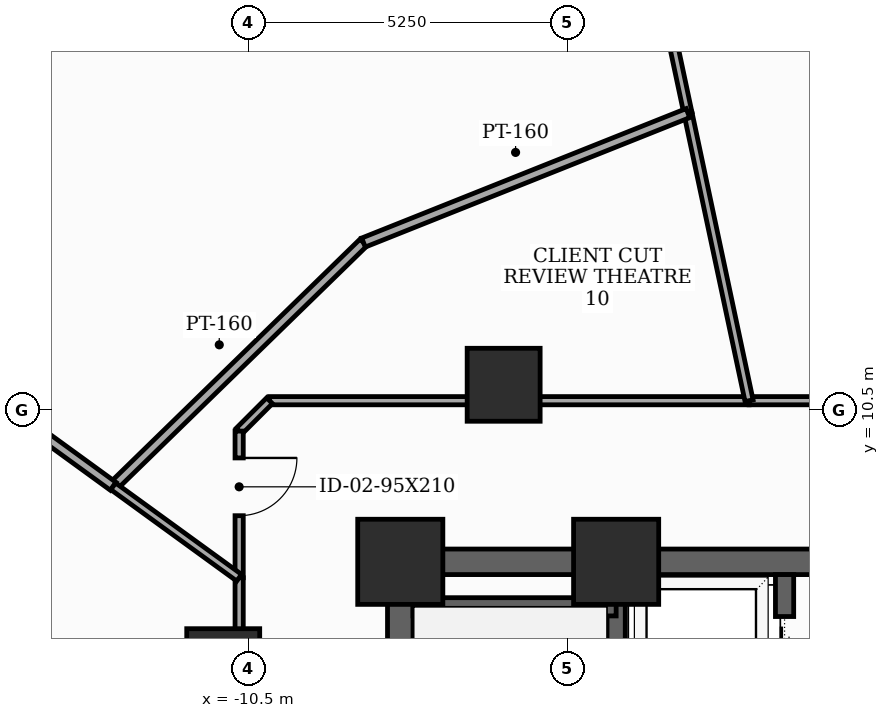
"""IFC4 building model, lengths in metres.
Left out: names, types, materials, properties, quantities, classifications, styles, units other than length and angle.
Written with IfcOpenShell. Run it as: python <this file> out.ifc"""

import sys

from ifc_helpers import new_model, si_unit, direction, frame, frame_2d, origin, origin_2d, place, context, subcontext, project, spatial, rectangle, extrude, element, fill, save


model = new_model("IFC4")
c1 = context("Model", 3, precision=1e-05, world=origin(), true_north=direction((0.0, 1.0)))
c2 = subcontext(c1, "Body", "Model", "MODEL_VIEW")
j1 = project(units=[si_unit("LENGTHUNIT", "METRE"), si_unit("PLANEANGLEUNIT", "RADIAN")], contexts=[c1])
p1 = place(None, origin())
s1 = spatial("IfcSite", under=j1, at=p1, CompositionType="ELEMENT")
p2 = place(p1, origin())
s2 = spatial("IfcBuilding", under=s1, at=p2, CompositionType="ELEMENT")
p3 = place(p2, frame((0.0, 0.0, 90.3)))
s3 = spatial("IfcBuildingStorey", under=s2, at=p3, CompositionType="ELEMENT", Elevation=90.3)
for number, where, z_axis, x_axis in (
    (1, (-4.45, 8.0, 0.0), (0.0, 0.0, 1.0), (1.0, 0.0, 0.0)),
    (2, (-8.0, 8.0, 0.0), (0.0, 0.0, 1.0), (1.0, 0.0, 0.0)),
):
    element("IfcColumn", number, at=place(p3, frame(where, z_axis=z_axis, x_axis=x_axis)), inside=s3, PredefinedType="COLUMN", context=c2, shape_type="SweptSolid", body=[
        extrude(rectangle(XDim=1.4, YDim=1.4, at=origin_2d()), origin(), (0.0, 0.0, 1.0), 3.7),
    ])
for number, where, z_axis, x_axis in (
    (3, (-6.3, 10.912, 0.0), (0.0, 0.0, 1.0), (1.0, 0.0, 0.0)),
    (4, (-10.912, 6.3, 0.0), (0.0, 0.0, 1.0), (1.0, 0.0, 0.0)),
):
    element("IfcColumn", number, at=place(p3, frame(where, z_axis=z_axis, x_axis=x_axis)), inside=s3, PredefinedType="COLUMN", context=c2, shape_type="SweptSolid", body=[
        extrude(rectangle(XDim=1.2, YDim=1.2, at=origin_2d()), origin(), (0.0, 0.0, 1.0), 3.7),
    ])
p4 = place(p3, frame((-8.0, -8.0, 0.0), z_axis=(0.0, 0.0, 1.0), x_axis=(0.0, 1.0, 0.0)))
e5 = element("IfcWall", 5, at=p4, inside=s3, PredefinedType="SHEAR", context=c2, shape_type="SweptSolid", body=[
    extrude(rectangle(XDim=16.0, YDim=0.42, at=frame_2d((8.0, 0.0))), origin(), (0.0, 0.0, 1.0), 3.5),
])
p5 = place(p4, frame((0.922, 0.0, 0.0)))
e6 = element("IfcOpeningElement", 6, at=p5, cuts=e5, PredefinedType="OPENING", context=c2, shape_type="SweptSolid", body=[
    extrude(rectangle(XDim=0.85, YDim=2.02, at=frame_2d((0.425, 1.01))), frame((0.0, 0.22, 0.0), z_axis=(0.0, -1.0, 0.0), x_axis=(1.0, 0.0, 0.0)), (0.0, 0.0, 1.0), 0.44),
])
p6 = place(p4, frame((5.35, 0.0, 0.0)))
e7 = element("IfcOpeningElement", 7, at=p6, cuts=e5, PredefinedType="OPENING", context=c2, shape_type="SweptSolid", body=[
    extrude(rectangle(XDim=1.05, YDim=2.15, at=frame_2d((0.525, 1.075))), frame((0.0, 0.22, 0.0), z_axis=(0.0, -1.0, 0.0), x_axis=(1.0, 0.0, 0.0)), (0.0, 0.0, 1.0), 0.44),
])
p7 = place(p3, frame((-8.0, 8.0, 0.0), z_axis=(0.0, 0.0, 1.0), x_axis=(1.0, 0.0, 0.0)))
e8 = element("IfcWall", 8, at=p7, inside=s3, PredefinedType="SHEAR", context=c2, shape_type="SweptSolid", body=[
    extrude(rectangle(XDim=16.0, YDim=0.42, at=frame_2d((8.0, 0.0))), origin(), (0.0, 0.0, 1.0), 3.5),
])
p8 = place(p7, frame((7.1, 0.0, 0.0)))
e9 = element("IfcOpeningElement", 9, at=p8, cuts=e8, PredefinedType="OPENING", context=c2, shape_type="SweptSolid", body=[
    extrude(rectangle(XDim=1.8, YDim=2.15, at=frame_2d((0.9, 1.075))), frame((0.0, 0.22, 0.0), z_axis=(0.0, -1.0, 0.0), x_axis=(1.0, 0.0, 0.0)), (0.0, 0.0, 1.0), 0.44),
])
p9 = place(p3, frame((-4.45, -7.79, 0.0), z_axis=(0.0, 0.0, 1.0), x_axis=(0.0, 1.0, 0.0)))
e10 = element("IfcWall", 10, at=p9, inside=s3, PredefinedType="SHEAR", context=c2, shape_type="SweptSolid", body=[
    extrude(rectangle(XDim=15.58, YDim=0.3, at=frame_2d((7.79, 0.0))), origin(), (0.0, 0.0, 1.0), 3.5),
])
p10 = place(p3, frame((-7.79, 7.26, 0.0), z_axis=(0.0, 0.0, 1.0), x_axis=(1.0, 0.0, 0.0)))
e11 = element("IfcWall", 11, at=p10, inside=s3, PredefinedType="SHEAR", context=c2, shape_type="SweptSolid", body=[
    extrude(rectangle(XDim=3.34, YDim=0.3, at=frame_2d((1.67, 0.0))), origin(), (0.0, 0.0, 1.0), 3.5),
])
p11 = place(p3, frame((-1.68, -4.85, 0.0), z_axis=(0.0, 0.0, 1.0), x_axis=(0.0, 1.0, 0.0)))
e12 = element("IfcWall", 12, at=p11, inside=s3, PredefinedType="SHEAR", context=c2, shape_type="SweptSolid", body=[
    extrude(rectangle(XDim=12.64, YDim=0.3, at=frame_2d((6.32, 0.0))), origin(), (0.0, 0.0, 1.0), 3.5),
])
p12 = place(p11, frame((3.95, 0.0, 0.0)))
e13 = element("IfcOpeningElement", 13, at=p12, cuts=e12, PredefinedType="OPENING", context=c2, shape_type="SweptSolid", body=[
    extrude(rectangle(XDim=1.1, YDim=2.1, at=frame_2d((0.55, 1.05))), frame((0.0, 0.16, 0.0), z_axis=(0.0, -1.0, 0.0), x_axis=(1.0, 0.0, 0.0)), (0.0, 0.0, 1.0), 0.32),
])
p13 = place(p11, frame((6.25, 0.0, 0.0)))
e14 = element("IfcOpeningElement", 14, at=p13, cuts=e12, PredefinedType="OPENING", context=c2, shape_type="SweptSolid", body=[
    extrude(rectangle(XDim=1.1, YDim=2.1, at=frame_2d((0.55, 1.05))), frame((0.0, 0.16, 0.0), z_axis=(0.0, -1.0, 0.0), x_axis=(1.0, 0.0, 0.0)), (0.0, 0.0, 1.0), 0.32),
])
p14 = place(p11, frame((8.55, 0.0, 0.0)))
e15 = element("IfcOpeningElement", 15, at=p14, cuts=e12, PredefinedType="OPENING", context=c2, shape_type="SweptSolid", body=[
    extrude(rectangle(XDim=1.1, YDim=2.1, at=frame_2d((0.55, 1.05))), frame((0.0, 0.16, 0.0), z_axis=(0.0, -1.0, 0.0), x_axis=(1.0, 0.0, 0.0)), (0.0, 0.0, 1.0), 0.32),
])
p15 = place(p11, frame((10.85, 0.0, 0.0)))
e16 = element("IfcOpeningElement", 16, at=p15, cuts=e12, PredefinedType="OPENING", context=c2, shape_type="SweptSolid", body=[
    extrude(rectangle(XDim=1.1, YDim=2.1, at=frame_2d((0.55, 1.05))), frame((0.0, 0.16, 0.0), z_axis=(0.0, -1.0, 0.0), x_axis=(1.0, 0.0, 0.0)), (0.0, 0.0, 1.0), 0.32),
])
p16 = place(p11, frame((1.15, 0.0, 0.0)))
e17 = element("IfcOpeningElement", 17, at=p16, cuts=e12, PredefinedType="OPENING", context=c2, shape_type="SweptSolid", body=[
    extrude(rectangle(XDim=0.92, YDim=2.1, at=frame_2d((0.46, 1.05))), frame((0.0, 0.16, 0.0), z_axis=(0.0, -1.0, 0.0), x_axis=(1.0, 0.0, 0.0)), (0.0, 0.0, 1.0), 0.32),
])
p17 = place(p3, frame((10.15, 10.65, 0.0), z_axis=(0.0, 0.0, 1.0), x_axis=(-1.0, 0.0, 0.0)))
e18 = element("IfcWall", 18, at=p17, inside=s3, PredefinedType="PARTITIONING", context=c2, shape_type="SweptSolid", body=[
    extrude(rectangle(XDim=12.414, YDim=0.135, at=frame_2d((6.207, 0.0))), origin(), (0.0, 0.0, 1.0), 2.785),
])
p18 = place(p17, frame((7.222, 0.0, 0.0)))
e19 = element("IfcOpeningElement", 19, at=p18, cuts=e18, PredefinedType="OPENING", context=c2, shape_type="SweptSolid", body=[
    extrude(rectangle(XDim=0.95, YDim=2.1, at=frame_2d((0.475, 1.05))), frame((0.0, 0.077, 0.0), z_axis=(0.0, -1.0, 0.0), x_axis=(1.0, 0.0, 0.0)), (0.0, 0.0, 1.0), 0.155),
])
p19 = place(p3, frame((-2.264, 10.65, 0.0), z_axis=(0.0, 0.0, 1.0), x_axis=(-1.0, 0.0, 0.0)))
e20 = element("IfcWall", 20, at=p19, inside=s3, PredefinedType="PARTITIONING", context=c2, shape_type="SweptSolid", body=[
    extrude(rectangle(XDim=7.886, YDim=0.135, at=frame_2d((3.943, 0.0))), origin(), (0.0, 0.0, 1.0), 2.785),
])
p20 = place(p3, frame((-10.15, 10.65, 0.0), z_axis=(0.0, 0.0, 1.0), x_axis=(-0.707106781187, -0.707106781187, 0.0)))
e21 = element("IfcWall", 21, at=p20, inside=s3, PredefinedType="PARTITIONING", context=c2, shape_type="SweptSolid", body=[
    extrude(rectangle(XDim=0.707, YDim=0.135, at=frame_2d((0.354, 0.0))), origin(), (0.0, 0.0, 1.0), 3.5),
])
p21 = place(p3, frame((-10.65, 10.15, 0.0), z_axis=(0.0, 0.0, 1.0), x_axis=(0.0, -1.0, 0.0)))
e22 = element("IfcWall", 22, at=p21, inside=s3, PredefinedType="PARTITIONING", context=c2, shape_type="SweptSolid", body=[
    extrude(rectangle(XDim=2.412, YDim=0.135, at=frame_2d((1.206, 0.0))), origin(), (0.0, 0.0, 1.0), 3.5),
])
p22 = place(p21, frame((0.442, 0.0, 0.0)))
e23 = element("IfcOpeningElement", 23, at=p22, cuts=e22, PredefinedType="OPENING", context=c2, shape_type="SweptSolid", body=[
    extrude(rectangle(XDim=0.95, YDim=2.1, at=frame_2d((0.475, 1.05))), frame((0.0, 0.077, 0.0), z_axis=(0.0, -1.0, 0.0), x_axis=(1.0, 0.0, 0.0)), (0.0, 0.0, 1.0), 0.155),
])
p23 = place(p3, frame((-10.65, 7.738, 0.0), z_axis=(0.0, 0.0, 1.0), x_axis=(0.0, -1.0, 0.0)))
e24 = element("IfcWall", 24, at=p23, inside=s3, PredefinedType="PARTITIONING", context=c2, shape_type="SweptSolid", body=[
    extrude(rectangle(XDim=5.288, YDim=0.135, at=frame_2d((2.644, 0.0))), origin(), (0.0, 0.0, 1.0), 2.785),
])
p24 = place(p23, frame((3.755, 0.0, 0.0)))
e25 = element("IfcOpeningElement", 25, at=p24, cuts=e24, PredefinedType="OPENING", context=c2, shape_type="SweptSolid", body=[
    extrude(rectangle(XDim=0.95, YDim=2.1, at=frame_2d((0.475, 1.05))), frame((0.0, 0.077, 0.0), z_axis=(0.0, -1.0, 0.0), x_axis=(1.0, 0.0, 0.0)), (0.0, 0.0, 1.0), 0.155),
])
p25 = place(p3, frame((-6.381, 30.021, 0.0), z_axis=(0.0, 0.0, 1.0), x_axis=(0.207886847462, -0.978152881022, 0.0)))
e26 = element("IfcWall", 26, at=p25, inside=s3, PredefinedType="PARTITIONING", context=c2, shape_type="SweptSolid", body=[
    extrude(rectangle(XDim=14.968, YDim=0.135, at=frame_2d((7.484, 0.0))), origin(), (0.0, 0.0, 1.0), 2.935),
])
p26 = place(p25, frame((7.024, 0.0, 0.0)))
e27 = element("IfcOpeningElement", 27, at=p26, cuts=e26, PredefinedType="OPENING", context=c2, shape_type="SweptSolid", body=[
    extrude(rectangle(XDim=0.92, YDim=2.1, at=frame_2d((0.46, 1.05))), frame((0.0, 0.077, 0.0), z_axis=(0.0, -1.0, 0.0), x_axis=(1.0, 0.0, 0.0)), (0.0, 0.0, 1.0), 0.155),
])
p27 = place(p3, frame((-3.269, 15.38, 0.0), z_axis=(0.0, 0.0, 1.0), x_axis=(0.207859963491, -0.978158594287, 0.0)))
e28 = element("IfcWall", 28, at=p27, inside=s3, PredefinedType="PARTITIONING", context=c2, shape_type="SweptSolid", body=[
    extrude(rectangle(XDim=4.836, YDim=0.135, at=frame_2d((2.418, 0.0))), origin(), (0.0, 0.0, 1.0), 2.785),
])
p28 = place(p3, frame((-12.721, 9.242, 0.0), z_axis=(0.0, 0.0, 1.0), x_axis=(0.716351016203, 0.697740081682, 0.0)))
e29 = element("IfcWall", 29, at=p28, inside=s3, PredefinedType="PARTITIONING", context=c2, shape_type="SweptSolid", body=[
    extrude(rectangle(XDim=5.746, YDim=0.16, at=frame_2d((2.873, 0.0))), origin(), (0.0, 0.0, 1.0), 2.785),
])
p29 = place(p3, frame((-8.605, 13.251, 0.0), z_axis=(0.0, 0.0, 1.0), x_axis=(0.928804577443, 0.370569908277, 0.0)))
e30 = element("IfcWall", 30, at=p29, inside=s3, PredefinedType="PARTITIONING", context=c2, shape_type="SweptSolid", body=[
    extrude(rectangle(XDim=5.745, YDim=0.16, at=frame_2d((2.873, 0.0))), origin(), (0.0, 0.0, 1.0), 2.785),
])
p30 = place(p3, frame((-16.004, 11.628, 0.0), z_axis=(0.0, 0.0, 1.0), x_axis=(0.80899612579, -0.587813974364, 0.0)))
e31 = element("IfcWall", 31, at=p30, inside=s3, PredefinedType="PARTITIONING", context=c2, shape_type="SweptSolid", body=[
    extrude(rectangle(XDim=4.059, YDim=0.16, at=frame_2d((2.029, 0.0))), origin(), (0.0, 0.0, 1.0), 2.935),
])
p31 = place(p3, frame((-12.721, 9.242, 0.0), z_axis=(0.0, 0.0, 1.0), x_axis=(0.80916485127, -0.58758169089, 0.0)))
e32 = element("IfcWall", 32, at=p31, inside=s3, PredefinedType="PARTITIONING", context=c2, shape_type="SweptSolid", body=[
    extrude(rectangle(XDim=2.56, YDim=0.135, at=frame_2d((1.28, 0.0))), origin(), (0.0, 0.0, 1.0), 3.125),
])
p32 = place(p15, origin())
e33 = element("IfcDoor", 33, at=p32, inside=s3, OperationType="SLIDING_TO_LEFT", PredefinedType="DOOR", context=c2, shape_type="SweptSolid", body=[
    extrude(rectangle(XDim=1.1, YDim=2.1, at=frame_2d((0.55, 1.05))), frame((0.0, 0.025, 0.0), z_axis=(0.0, -1.0, 0.0), x_axis=(1.0, 0.0, 0.0)), (0.0, 0.0, 1.0), 0.05),
])
fill(e16, e33)
p33 = place(p22, origin())
e34 = element("IfcDoor", 34, at=p33, inside=s3, OperationType="SINGLE_SWING_LEFT", PredefinedType="DOOR", context=c2, shape_type="SweptSolid", body=[
    extrude(rectangle(XDim=0.95, YDim=2.1, at=frame_2d((0.475, 1.05))), frame((0.0, 0.025, 0.0), z_axis=(0.0, -1.0, 0.0), x_axis=(1.0, 0.0, 0.0)), (0.0, 0.0, 1.0), 0.05),
])
fill(e23, e34)
save(model, sys.argv[1])
